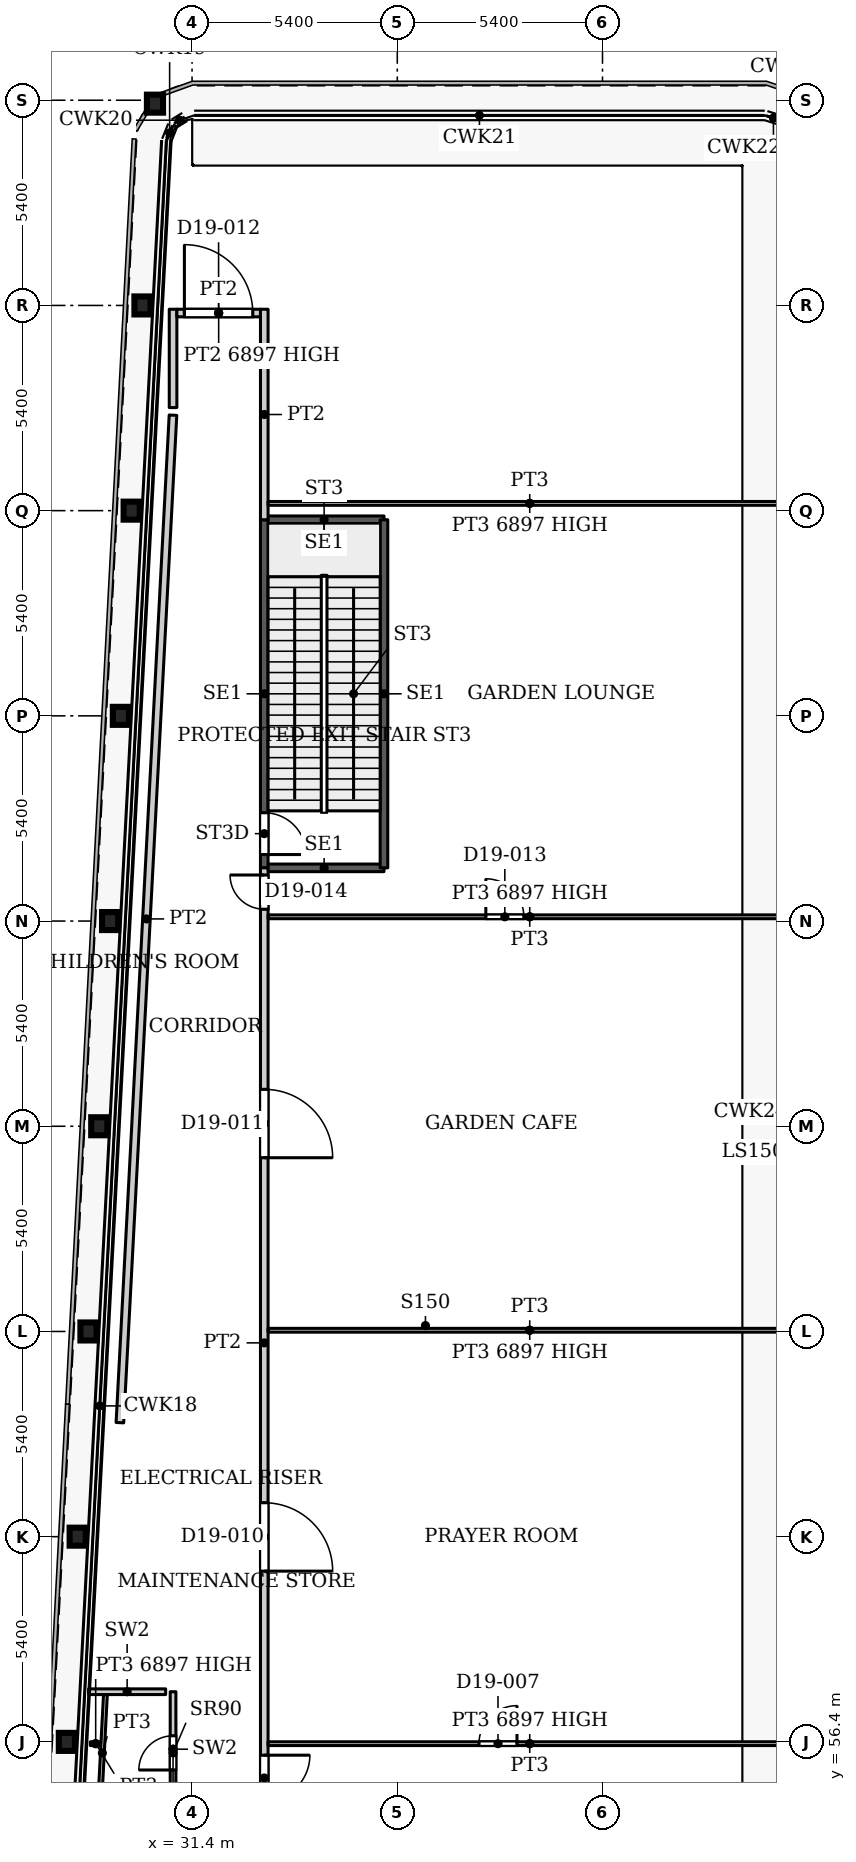
"""IFC4 building model, lengths in metres.
Left out: names, types, materials, properties, quantities, classifications, styles, units other than length and angle.
Written with IfcOpenShell. Run it as: python <this file> out.ifc"""

import sys

from ifc_helpers import new_model, si_unit, direction, frame, frame_2d, origin, origin_2d, place, context, subcontext, project, spatial, rectangle, i_section, extrude, source, transform, mapped, element, fill, save


model = new_model("IFC4")
c1 = context("Model", 3, precision=1e-05, world=origin(), true_north=direction((0.0, 1.0)))
c2 = subcontext(c1, "Body", "Model", "MODEL_VIEW")
j1 = project(units=[si_unit("LENGTHUNIT", "METRE"), si_unit("PLANEANGLEUNIT", "RADIAN")], contexts=[c1])
p1 = place(None, origin())
s1 = spatial("IfcSite", under=j1, at=p1, CompositionType="ELEMENT")
p2 = place(p1, origin())
s2 = spatial("IfcBuilding", under=s1, at=p2, CompositionType="ELEMENT")
p3 = place(p2, frame((0.0, 0.0, 81.2)))
s3 = spatial("IfcBuildingStorey", under=s2, at=p3, CompositionType="ELEMENT", Elevation=81.2)
for number, where, z_axis, x_axis in (
    (1, (28.106, 56.4, 0.0), (0.0, 0.0, 1.0), (1.0, 0.0, 0.0)),
    (2, (28.39, 61.8, 0.0), (0.0, 0.0, 1.0), (1.0, 0.0, 0.0)),
    (3, (28.674, 67.2, 0.0), (0.0, 0.0, 1.0), (1.0, 0.0, 0.0)),
    (4, (28.958, 72.6, 0.0), (0.0, 0.0, 1.0), (1.0, 0.0, 0.0)),
    (5, (29.243, 78.0, 0.0), (0.0, 0.0, 1.0), (1.0, 0.0, 0.0)),
    (6, (29.527, 83.4, 0.0), (0.0, 0.0, 1.0), (1.0, 0.0, 0.0)),
    (7, (29.811, 88.8, 0.0), (0.0, 0.0, 1.0), (1.0, 0.0, 0.0)),
    (8, (30.095, 94.2, 0.0), (0.0, 0.0, 1.0), (1.0, 0.0, 0.0)),
    (9, (30.424, 99.51, 0.0), (0.0, 0.0, 1.0), (1.0, 0.0, 0.0)),
):
    element("IfcColumn", number, at=place(p3, frame(where, z_axis=z_axis, x_axis=x_axis)), inside=s3, PredefinedType="COLUMN", context=c2, shape_type="SweptSolid", body=[
        extrude(i_section(OverallWidth=0.424, OverallDepth=0.474, WebThickness=0.048, FlangeThickness=0.077, FilletRadius=0.014, at=origin_2d()), origin(), (0.0, 0.0, 1.0), 7.8),
    ])
for number, where, z_axis, x_axis in (
    (10, (33.3, 79.4, 0.0), (0.0, 0.0, 1.0), (1.0, 0.0, 0.0)),
    (11, (33.3, 88.56, 0.0), (0.0, 0.0, 1.0), (1.0, 0.0, 0.0)),
):
    element("IfcWall", number, at=place(p3, frame(where, z_axis=z_axis, x_axis=x_axis)), inside=s3, PredefinedType="SHEAR", context=c2, shape_type="SweptSolid", body=[
        extrude(rectangle(XDim=3.15, YDim=0.2, at=frame_2d((1.575, 0.0))), origin(), (0.0, 0.0, 1.0), 7.8),
    ])
p4 = place(p3, frame((33.3, 79.4, 0.0), z_axis=(0.0, 0.0, 1.0), x_axis=(0.0, 1.0, 0.0)))
e12 = element("IfcWall", 12, at=p4, inside=s3, PredefinedType="SHEAR", context=c2, shape_type="SweptSolid", body=[
    extrude(rectangle(XDim=9.16, YDim=0.2, at=frame_2d((4.58, 0.0))), origin(), (0.0, 0.0, 1.0), 7.8),
])
p5 = place(p4, frame((0.35, 0.0, 0.0)))
e13 = element("IfcOpeningElement", 13, at=p5, cuts=e12, PredefinedType="OPENING", context=c2, shape_type="SweptSolid", body=[
    extrude(rectangle(XDim=1.1, YDim=2.2, at=frame_2d((0.55, 1.1))), frame((0.0, 0.11, 0.0), z_axis=(0.0, -1.0, 0.0), x_axis=(1.0, 0.0, 0.0)), (0.0, 0.0, 1.0), 0.22),
])
p6 = place(p3, frame((36.45, 79.4, 0.0), z_axis=(0.0, 0.0, 1.0), x_axis=(0.0, 1.0, 0.0)))
e14 = element("IfcWall", 14, at=p6, inside=s3, PredefinedType="SHEAR", context=c2, shape_type="SweptSolid", body=[
    extrude(rectangle(XDim=9.16, YDim=0.2, at=frame_2d((4.58, 0.0))), origin(), (0.0, 0.0, 1.0), 7.8),
])
p7 = place(p3, frame((30.9, 54.695, 0.0), z_axis=(0.0, 0.0, 1.0), x_axis=(0.0, 1.0, 0.0)))
e15 = element("IfcWall", 15, at=p7, inside=s3, PredefinedType="PARTITIONING", context=c2, shape_type="SweptSolid", body=[
    extrude(rectangle(XDim=3.025, YDim=0.15, at=frame_2d((1.512, 0.0))), origin(), (0.0, 0.0, 1.0), 6.897),
])
p8 = place(p7, frame((0.965, 0.0, 0.0)))
e16 = element("IfcOpeningElement", 16, at=p8, cuts=e15, PredefinedType="OPENING", context=c2, shape_type="SweptSolid", body=[
    extrude(rectangle(XDim=0.9, YDim=2.2, at=frame_2d((0.45, 1.1))), frame((0.0, 0.085, 0.0), z_axis=(0.0, -1.0, 0.0), x_axis=(1.0, 0.0, 0.0)), (0.0, 0.0, 1.0), 0.17),
])
p9 = place(p3, frame((28.678, 57.72, 0.0), z_axis=(0.0, 0.0, 1.0), x_axis=(1.0, 0.0, 0.0)))
e17 = element("IfcWall", 17, at=p9, inside=s3, PredefinedType="PARTITIONING", context=c2, shape_type="SweptSolid", body=[
    extrude(rectangle(XDim=2.027, YDim=0.15, at=frame_2d((1.014, 0.0))), origin(), (0.0, 0.0, 1.0), 7.8),
])
p10 = place(p3, frame((28.724, 56.353, 0.0), z_axis=(0.0, 0.0, 1.0), x_axis=(1.0, 0.0, 0.0)))
e18 = element("IfcWall", 18, at=p10, inside=s3, PredefinedType="PARTITIONING", context=c2, shape_type="SweptSolid", body=[
    extrude(rectangle(XDim=0.28, YDim=0.1, at=frame_2d((0.14, 0.0))), origin(), (0.0, 0.0, 1.0), 6.897),
])
p11 = place(p3, frame((28.96, 54.574, 0.0), z_axis=(0.0, 0.0, 1.0), x_axis=(0.052145785312, 0.998639483034, 0.0)))
e19 = element("IfcWall", 19, at=p11, inside=s3, PredefinedType="PARTITIONING", context=c2, shape_type="SweptSolid", body=[
    extrude(rectangle(XDim=3.071, YDim=0.1, at=frame_2d((1.536, 0.0))), origin(), (0.0, 0.0, 1.0), 7.5),
])
p12 = place(p3, frame((29.501, 64.8, 0.0), z_axis=(0.0, 0.0, 1.0), x_axis=(0.052619165502, 0.998614652117, 0.0)))
e20 = element("IfcWall", 20, at=p12, inside=s3, PredefinedType="PARTITIONING", context=c2, shape_type="SweptSolid", body=[
    extrude(rectangle(XDim=26.549, YDim=0.2, at=frame_2d((13.274, 0.0))), origin(), (0.0, 0.0, 1.0), 7.5),
])
p13 = place(p3, frame((30.9, 91.512, 0.0), z_axis=(0.0, 0.0, 1.0), x_axis=(0.0, 1.0, 0.0)))
e21 = element("IfcWall", 21, at=p13, inside=s3, PredefinedType="PARTITIONING", context=c2, shape_type="SweptSolid", body=[
    extrude(rectangle(XDim=2.588, YDim=0.2, at=frame_2d((1.294, 0.0))), origin(), (0.0, 0.0, 1.0), 7.5),
])
p14 = place(p3, frame((31.0, 94.0, 0.0), z_axis=(0.0, 0.0, 1.0), x_axis=(1.0, 0.0, 0.0)))
e22 = element("IfcWall", 22, at=p14, inside=s3, PredefinedType="PARTITIONING", context=c2, shape_type="SweptSolid", body=[
    extrude(rectangle(XDim=2.2, YDim=0.2, at=frame_2d((1.1, 0.0))), origin(), (0.0, 0.0, 1.0), 6.897),
])
p15 = place(p14, frame((0.198, 0.0, 0.0)))
e23 = element("IfcOpeningElement", 23, at=p15, cuts=e22, PredefinedType="OPENING", context=c2, shape_type="SweptSolid", body=[
    extrude(rectangle(XDim=1.8, YDim=2.1, at=frame_2d((0.9, 1.05))), frame((0.0, 0.11, 0.0), z_axis=(0.0, -1.0, 0.0), x_axis=(1.0, 0.0, 0.0)), (0.0, 0.0, 1.0), 0.22),
])
p16 = place(p3, frame((33.3, 54.4, 0.0), z_axis=(0.0, 0.0, 1.0), x_axis=(0.0, 1.0, 0.0)))
e24 = element("IfcWall", 24, at=p16, inside=s3, PredefinedType="PARTITIONING", context=c2, shape_type="SweptSolid", body=[
    extrude(rectangle(XDim=25.0, YDim=0.2, at=frame_2d((12.5, 0.0))), origin(), (0.0, 0.0, 1.0), 7.5),
])
p17 = place(p16, frame((0.45, 0.0, 0.0)))
e25 = element("IfcOpeningElement", 25, at=p17, cuts=e24, PredefinedType="OPENING", context=c2, shape_type="SweptSolid", body=[
    extrude(rectangle(XDim=1.2, YDim=2.1, at=frame_2d((0.6, 1.05))), frame((0.0, 0.11, 0.0), z_axis=(0.0, -1.0, 0.0), x_axis=(1.0, 0.0, 0.0)), (0.0, 0.0, 1.0), 0.22),
])
p18 = place(p16, frame((6.493, 0.0, 0.0)))
e26 = element("IfcOpeningElement", 26, at=p18, cuts=e24, PredefinedType="OPENING", context=c2, shape_type="SweptSolid", body=[
    extrude(rectangle(XDim=1.8, YDim=2.1, at=frame_2d((0.9, 1.05))), frame((0.0, 0.11, 0.0), z_axis=(0.0, -1.0, 0.0), x_axis=(1.0, 0.0, 0.0)), (0.0, 0.0, 1.0), 0.22),
])
p19 = place(p16, frame((17.372, 0.0, 0.0)))
e27 = element("IfcOpeningElement", 27, at=p19, cuts=e24, PredefinedType="OPENING", context=c2, shape_type="SweptSolid", body=[
    extrude(rectangle(XDim=1.8, YDim=2.1, at=frame_2d((0.9, 1.05))), frame((0.0, 0.11, 0.0), z_axis=(0.0, -1.0, 0.0), x_axis=(1.0, 0.0, 0.0)), (0.0, 0.0, 1.0), 0.22),
])
p20 = place(p16, frame((23.912, 0.0, 0.0)))
e28 = element("IfcOpeningElement", 28, at=p20, cuts=e24, PredefinedType="OPENING", context=c2, shape_type="SweptSolid", body=[
    extrude(rectangle(XDim=0.9, YDim=2.1, at=frame_2d((0.45, 1.05))), frame((0.0, 0.11, 0.0), z_axis=(0.0, -1.0, 0.0), x_axis=(1.0, 0.0, 0.0)), (0.0, 0.0, 1.0), 0.22),
])
p21 = place(p3, frame((33.3, 88.56, 0.0), z_axis=(0.0, 0.0, 1.0), x_axis=(0.0, 1.0, 0.0)))
e29 = element("IfcWall", 29, at=p21, inside=s3, PredefinedType="PARTITIONING", context=c2, shape_type="SweptSolid", body=[
    extrude(rectangle(XDim=5.54, YDim=0.2, at=frame_2d((2.77, 0.0))), origin(), (0.0, 0.0, 1.0), 7.5),
])
p22 = place(p3, frame((33.4, 56.353, 0.0), z_axis=(0.0, 0.0, 1.0), x_axis=(1.0, 0.0, 0.0)))
e30 = element("IfcWall", 30, at=p22, inside=s3, PredefinedType="PARTITIONING", context=c2, shape_type="SweptSolid", body=[
    extrude(rectangle(XDim=13.77, YDim=0.1, at=frame_2d((6.885, 0.0))), origin(), (0.0, 0.0, 1.0), 6.897),
])
p23 = place(p22, frame((5.55, 0.0, 0.0)))
e31 = element("IfcOpeningElement", 31, at=p23, cuts=e30, PredefinedType="OPENING", context=c2, shape_type="SweptSolid", body=[
    extrude(rectangle(XDim=1.0, YDim=2.1, at=frame_2d((0.5, 1.05))), frame((0.0, 0.06, 0.0), z_axis=(0.0, -1.0, 0.0), x_axis=(1.0, 0.0, 0.0)), (0.0, 0.0, 1.0), 0.12),
])
p24 = place(p3, frame((33.4, 67.232, 0.0), z_axis=(0.0, 0.0, 1.0), x_axis=(1.0, 0.0, 0.0)))
e32 = element("IfcWall", 32, at=p24, inside=s3, PredefinedType="PARTITIONING", context=c2, shape_type="SweptSolid", body=[
    extrude(rectangle(XDim=13.77, YDim=0.1, at=frame_2d((6.885, 0.0))), origin(), (0.0, 0.0, 1.0), 6.897),
])
p25 = place(p3, frame((33.4, 78.112, 0.0), z_axis=(0.0, 0.0, 1.0), x_axis=(1.0, 0.0, 0.0)))
e33 = element("IfcWall", 33, at=p25, inside=s3, PredefinedType="PARTITIONING", context=c2, shape_type="SweptSolid", body=[
    extrude(rectangle(XDim=13.77, YDim=0.1, at=frame_2d((6.885, 0.0))), origin(), (0.0, 0.0, 1.0), 6.897),
])
p26 = place(p25, frame((5.73, 0.0, 0.0)))
e34 = element("IfcOpeningElement", 34, at=p26, cuts=e33, PredefinedType="OPENING", context=c2, shape_type="SweptSolid", body=[
    extrude(rectangle(XDim=1.0, YDim=2.1, at=frame_2d((0.5, 1.05))), frame((0.0, 0.06, 0.0), z_axis=(0.0, -1.0, 0.0), x_axis=(1.0, 0.0, 0.0)), (0.0, 0.0, 1.0), 0.12),
])
p27 = place(p3, frame((33.4, 88.991, 0.0), z_axis=(0.0, 0.0, 1.0), x_axis=(1.0, 0.0, 0.0)))
e35 = element("IfcWall", 35, at=p27, inside=s3, PredefinedType="PARTITIONING", context=c2, shape_type="SweptSolid", body=[
    extrude(rectangle(XDim=13.77, YDim=0.1, at=frame_2d((6.885, 0.0))), origin(), (0.0, 0.0, 1.0), 6.897),
])
m1 = source(origin(), c2, "Body", "SweptSolid", [
    extrude(rectangle(XDim=0.9, YDim=2.2, at=frame_2d((0.45, 1.1))), frame((0.0, 0.025, 0.0), z_axis=(0.0, -1.0, 0.0), x_axis=(1.0, 0.0, 0.0)), (0.0, 0.0, 1.0), 0.05),
])
p28 = place(p8, origin())
e36 = element("IfcDoor", 36, at=p28, inside=s3, OperationType="SINGLE_SWING_LEFT", PredefinedType="DOOR", context=c2, shape_type="MappedRepresentation", body=[
    mapped(m1, transform((0.0, 0.0, 0.0), x_axis=(1.0, 0.0, 0.0), y_axis=(0.0, 1.0, 0.0), z_axis=(0.0, 0.0, 1.0), scale=1.0)),
])
fill(e16, e36)
m2 = source(origin(), c2, "Body", "SweptSolid", [
    extrude(rectangle(XDim=1.1, YDim=2.2, at=frame_2d((0.55, 1.1))), frame((0.0, 0.025, 0.0), z_axis=(0.0, -1.0, 0.0), x_axis=(1.0, 0.0, 0.0)), (0.0, 0.0, 1.0), 0.05),
])
p29 = place(p5, origin())
e37 = element("IfcDoor", 37, at=p29, inside=s3, OperationType="SINGLE_SWING_RIGHT", PredefinedType="DOOR", context=c2, shape_type="MappedRepresentation", body=[
    mapped(m2, transform((0.0, 0.0, 0.0), x_axis=(1.0, 0.0, 0.0), y_axis=(0.0, 1.0, 0.0), z_axis=(0.0, 0.0, 1.0), scale=1.0)),
])
fill(e13, e37)
m3 = source(origin(), c2, "Body", "SweptSolid", [
    extrude(rectangle(XDim=1.0, YDim=2.1, at=frame_2d((0.5, 1.05))), frame((0.0, 0.025, 0.0), z_axis=(0.0, -1.0, 0.0), x_axis=(1.0, 0.0, 0.0)), (0.0, 0.0, 1.0), 0.05),
])
p30 = place(p23, origin())
e38 = element("IfcDoor", 38, at=p30, inside=s3, OperationType="SINGLE_SWING_LEFT", PredefinedType="DOOR", context=c2, shape_type="MappedRepresentation", body=[
    mapped(m3, transform((0.0, 0.0, 0.0), x_axis=(1.0, 0.0, 0.0), y_axis=(0.0, 1.0, 0.0), z_axis=(0.0, 0.0, 1.0), scale=1.0)),
])
fill(e31, e38)
m4 = source(origin(), c2, "Body", "SweptSolid", [
    extrude(rectangle(XDim=1.2, YDim=2.1, at=frame_2d((0.6, 1.05))), frame((0.0, 0.025, 0.0), z_axis=(0.0, -1.0, 0.0), x_axis=(1.0, 0.0, 0.0)), (0.0, 0.0, 1.0), 0.05),
])
p31 = place(p17, origin())
e39 = element("IfcDoor", 39, at=p31, inside=s3, OperationType="SINGLE_SWING_RIGHT", PredefinedType="DOOR", context=c2, shape_type="MappedRepresentation", body=[
    mapped(m4, transform((0.0, 0.0, 0.0), x_axis=(1.0, 0.0, 0.0), y_axis=(0.0, 1.0, 0.0), z_axis=(0.0, 0.0, 1.0), scale=1.0)),
])
fill(e25, e39)
m5 = source(origin(), c2, "Body", "SweptSolid", [
    extrude(rectangle(XDim=1.8, YDim=2.1, at=frame_2d((0.9, 1.05))), frame((0.0, 0.025, 0.0), z_axis=(0.0, -1.0, 0.0), x_axis=(1.0, 0.0, 0.0)), (0.0, 0.0, 1.0), 0.05),
])
p32 = place(p18, origin())
e40 = element("IfcDoor", 40, at=p32, inside=s3, OperationType="DOUBLE_DOOR_SINGLE_SWING", PredefinedType="DOOR", context=c2, shape_type="MappedRepresentation", body=[
    mapped(m5, transform((0.0, 0.0, 0.0), x_axis=(1.0, 0.0, 0.0), y_axis=(0.0, 1.0, 0.0), z_axis=(0.0, 0.0, 1.0), scale=1.0)),
])
fill(e26, e40)
p33 = place(p19, origin())
e41 = element("IfcDoor", 41, at=p33, inside=s3, OperationType="DOUBLE_DOOR_SINGLE_SWING", PredefinedType="DOOR", context=c2, shape_type="MappedRepresentation", body=[
    mapped(m5, transform((0.0, 0.0, 0.0), x_axis=(1.0, 0.0, 0.0), y_axis=(0.0, 1.0, 0.0), z_axis=(0.0, 0.0, 1.0), scale=1.0)),
])
fill(e27, e41)
p34 = place(p15, origin())
e42 = element("IfcDoor", 42, at=p34, inside=s3, OperationType="DOUBLE_DOOR_SINGLE_SWING", PredefinedType="DOOR", context=c2, shape_type="MappedRepresentation", body=[
    mapped(m5, transform((0.0, 0.0, 0.0), x_axis=(1.0, 0.0, 0.0), y_axis=(0.0, 1.0, 0.0), z_axis=(0.0, 0.0, 1.0), scale=1.0)),
])
fill(e23, e42)
p35 = place(p26, origin())
e43 = element("IfcDoor", 43, at=p35, inside=s3, OperationType="SINGLE_SWING_LEFT", PredefinedType="DOOR", context=c2, shape_type="MappedRepresentation", body=[
    mapped(m3, transform((0.0, 0.0, 0.0), x_axis=(1.0, 0.0, 0.0), y_axis=(0.0, 1.0, 0.0), z_axis=(0.0, 0.0, 1.0), scale=1.0)),
])
fill(e34, e43)
m6 = source(origin(), c2, "Body", "SweptSolid", [
    extrude(rectangle(XDim=0.9, YDim=2.1, at=frame_2d((0.45, 1.05))), frame((0.0, 0.025, 0.0), z_axis=(0.0, -1.0, 0.0), x_axis=(1.0, 0.0, 0.0)), (0.0, 0.0, 1.0), 0.05),
])
p36 = place(p20, origin())
e44 = element("IfcDoor", 44, at=p36, inside=s3, OperationType="SINGLE_SWING_LEFT", PredefinedType="DOOR", context=c2, shape_type="MappedRepresentation", body=[
    mapped(m6, transform((0.0, 0.0, 0.0), x_axis=(1.0, 0.0, 0.0), y_axis=(0.0, 1.0, 0.0), z_axis=(0.0, 0.0, 1.0), scale=1.0)),
])
fill(e28, e44)
save(model, sys.argv[1])
